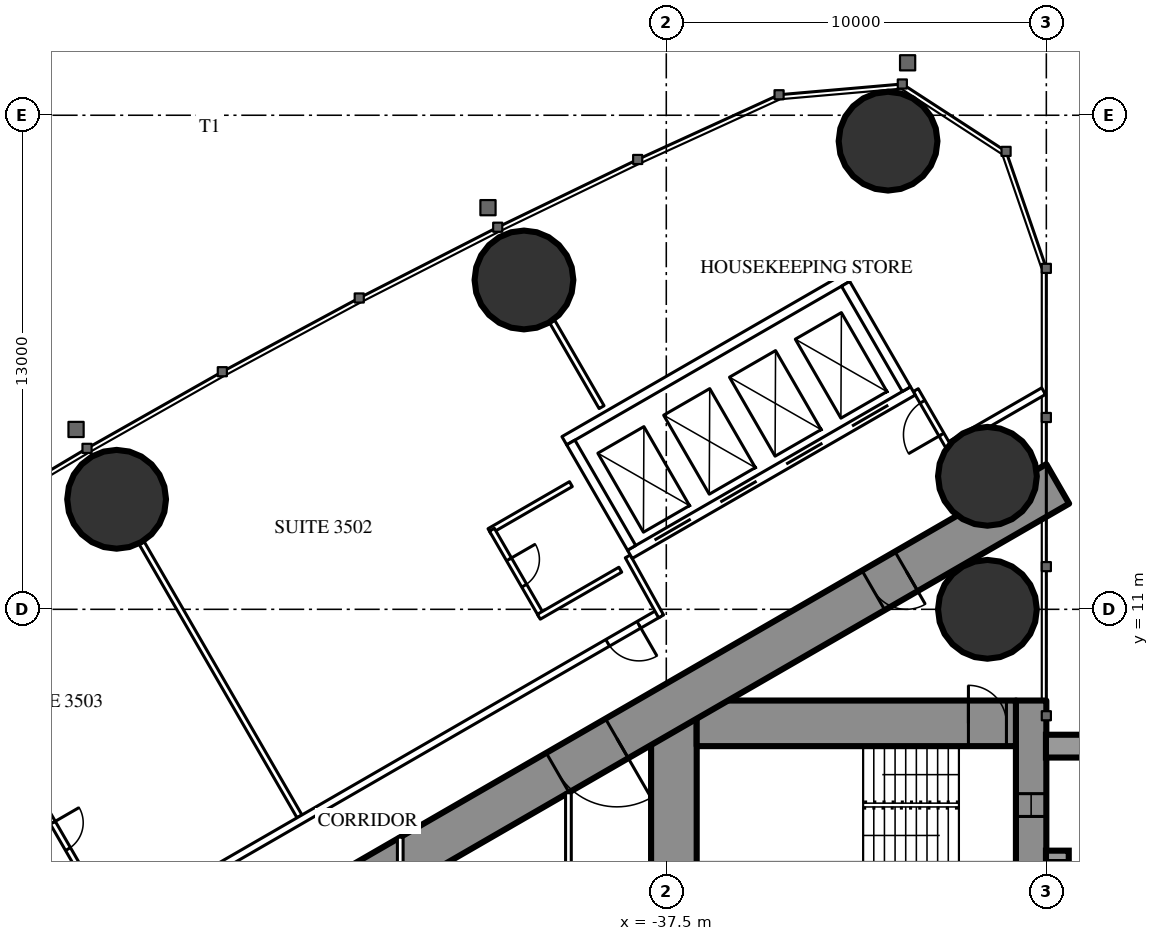
"""IFC4 building model, lengths in metres.
Left out: names, types, materials, properties, quantities, classifications, styles, units other than length and angle.
Written with IfcOpenShell. Run it as: python <this file> out.ifc"""

import sys

from ifc_helpers import new_model, si_unit, direction, frame, frame_2d, origin, origin_2d, place, context, subcontext, project, spatial, rectangle, hollow_circle, extrude, element, fill, save


model = new_model("IFC4")
c1 = context("Model", 3, precision=1e-05, world=origin(), true_north=direction((0.0, 1.0)))
c2 = subcontext(c1, "Body", "Model", "MODEL_VIEW")
j1 = project(units=[si_unit("LENGTHUNIT", "METRE"), si_unit("PLANEANGLEUNIT", "RADIAN")], contexts=[c1])
p1 = place(None, origin())
s1 = spatial("IfcSite", under=j1, at=p1, CompositionType="ELEMENT")
p2 = place(p1, origin())
s2 = spatial("IfcBuilding", under=s1, at=p2, CompositionType="ELEMENT")
p3 = place(p2, frame((0.0, 0.0, 132.6)))
s3 = spatial("IfcBuildingStorey", under=s2, at=p3, CompositionType="ELEMENT", Elevation=132.6)
for number, where, z_axis, x_axis in (
    (1, (-31.665, 23.318, 0.0), (0.0, 0.0, 1.0), (1.0, 0.0, 0.0)),
    (2, (-29.05, 11.0, 0.0), (0.0, 0.0, 1.0), (1.0, 0.0, 0.0)),
    (3, (-29.05, 14.5, 0.0), (0.0, 0.0, 1.0), (1.0, 0.0, 0.0)),
    (4, (-41.245, 19.666, 0.0), (0.0, 0.0, 1.0), (1.0, 0.0, 0.0)),
    (5, (-51.963, 13.895, 0.0), (0.0, 0.0, 1.0), (1.0, 0.0, 0.0)),
):
    element("IfcColumn", number, at=place(p3, frame(where, z_axis=z_axis, x_axis=x_axis)), inside=s3, PredefinedType="COLUMN", context=c2, shape_type="SweptSolid", body=[
        extrude(hollow_circle(Radius=1.3, WallThickness=0.1, at=origin_2d()), origin(), (0.0, 0.0, 1.0), 3.5),
    ])
p4 = place(p3, frame((-27.9, 8.6, 0.0), z_axis=(0.0, 0.0, 1.0), x_axis=(0.0, -1.0, 0.0)))
e6 = element("IfcWall", 6, at=p4, inside=s3, PredefinedType="SHEAR", context=c2, shape_type="SweptSolid", body=[
    extrude(rectangle(XDim=17.2, YDim=0.8, at=frame_2d((8.6, 0.0))), origin(), (0.0, 0.0, 1.0), 3.5),
])
p5 = place(p4, frame((2.45, 0.0, 0.6)))
e7 = element("IfcOpeningElement", 7, at=p5, cuts=e6, PredefinedType="OPENING", context=c2, shape_type="SweptSolid", body=[
    extrude(rectangle(XDim=0.6, YDim=2.1, at=frame_2d((0.3, 1.05))), frame((0.0, 0.41, 0.0), z_axis=(0.0, -1.0, 0.0), x_axis=(1.0, 0.0, 0.0)), (0.0, 0.0, 1.0), 0.82),
])
p6 = place(p4, frame((14.15, 0.0, 0.6)))
e8 = element("IfcOpeningElement", 8, at=p6, cuts=e6, PredefinedType="OPENING", context=c2, shape_type="SweptSolid", body=[
    extrude(rectangle(XDim=0.6, YDim=2.1, at=frame_2d((0.3, 1.05))), frame((0.0, 0.41, 0.0), z_axis=(0.0, -1.0, 0.0), x_axis=(1.0, 0.0, 0.0)), (0.0, 0.0, 1.0), 0.82),
])
p7 = place(p3, frame((-37.3, 8.6, 0.0), z_axis=(0.0, 0.0, 1.0), x_axis=(0.0, -1.0, 0.0)))
e9 = element("IfcWall", 9, at=p7, inside=s3, PredefinedType="SHEAR", context=c2, shape_type="SweptSolid", body=[
    extrude(rectangle(XDim=17.2, YDim=1.2, at=frame_2d((8.6, 0.0))), origin(), (0.0, 0.0, 1.0), 3.5),
])
p8 = place(p7, frame((7.7, 0.0, 0.0)))
e10 = element("IfcOpeningElement", 10, at=p8, cuts=e9, PredefinedType="OPENING", context=c2, shape_type="SweptSolid", body=[
    extrude(rectangle(XDim=1.8, YDim=2.2, at=frame_2d((0.9, 1.1))), frame((0.0, 0.61, 0.0), z_axis=(0.0, -1.0, 0.0), x_axis=(1.0, 0.0, 0.0)), (0.0, 0.0, 1.0), 1.22),
])
p9 = place(p3, frame((-28.3, 8.0, 0.0), z_axis=(0.0, 0.0, 1.0), x_axis=(-1.0, 0.0, 0.0)))
e11 = element("IfcWall", 11, at=p9, inside=s3, PredefinedType="SHEAR", context=c2, shape_type="SweptSolid", body=[
    extrude(rectangle(XDim=8.4, YDim=1.2, at=frame_2d((4.2, 0.0))), origin(), (0.0, 0.0, 1.0), 3.5),
])
p10 = place(p9, frame((0.25, 0.0, 0.0)))
e12 = element("IfcOpeningElement", 12, at=p10, cuts=e11, PredefinedType="OPENING", context=c2, shape_type="SweptSolid", body=[
    extrude(rectangle(XDim=1.0, YDim=2.2, at=frame_2d((0.5, 1.1))), frame((0.0, 0.61, 0.0), z_axis=(0.0, -1.0, 0.0), x_axis=(1.0, 0.0, 0.0)), (0.0, 0.0, 1.0), 1.22),
])
p11 = place(p3, frame((-27.2, 14.3, 0.0), z_axis=(0.0, 0.0, 1.0), x_axis=(-0.866026593062, -0.499997940104, 0.0)))
e13 = element("IfcWall", 13, at=p11, inside=s3, PredefinedType="SHEAR", context=c2, shape_type="SweptSolid", body=[
    extrude(rectangle(XDim=28.946, YDim=1.2, at=frame_2d((14.473, 0.0))), origin(), (0.0, 0.0, 1.0), 3.5),
])
p12 = place(p11, frame((4.6, 0.0, 0.0)))
e14 = element("IfcOpeningElement", 14, at=p12, cuts=e13, PredefinedType="OPENING", context=c2, shape_type="SweptSolid", body=[
    extrude(rectangle(XDim=1.0, YDim=2.2, at=frame_2d((0.5, 1.1))), frame((0.0, 0.61, 0.0), z_axis=(0.0, -1.0, 0.0), x_axis=(1.0, 0.0, 0.0)), (0.0, 0.0, 1.0), 1.22),
])
p13 = place(p11, frame((13.395, 0.0, 0.0)))
e15 = element("IfcOpeningElement", 15, at=p13, cuts=e13, PredefinedType="OPENING", context=c2, shape_type="SweptSolid", body=[
    extrude(rectangle(XDim=1.8, YDim=2.2, at=frame_2d((0.9, 1.1))), frame((0.0, 0.61, 0.0), z_axis=(0.0, -1.0, 0.0), x_axis=(1.0, 0.0, 0.0)), (0.0, 0.0, 1.0), 1.22),
])
p14 = place(p3, frame((-47.151, 5.552, 0.0), z_axis=(0.0, 0.0, 1.0), x_axis=(-0.500003012045, 0.866023664773, 0.0)))
e16 = element("IfcWall", 16, at=p14, inside=s3, PredefinedType="PARTITIONING", context=c2, shape_type="SweptSolid", body=[
    extrude(rectangle(XDim=8.311, YDim=0.15, at=frame_2d((4.156, 0.0))), origin(), (0.0, 0.0, 1.0), 2.2),
])
p15 = place(p3, frame((-39.202, 16.32, 0.0), z_axis=(0.0, 0.0, 1.0), x_axis=(-0.499947391036, 0.866055775454, 0.0)))
e17 = element("IfcWall", 17, at=p15, inside=s3, PredefinedType="PARTITIONING", context=c2, shape_type="SweptSolid", body=[
    extrude(rectangle(XDim=2.599, YDim=0.15, at=frame_2d((1.3, 0.0))), origin(), (0.0, 0.0, 1.0), 3.25),
])
p16 = place(p3, frame((-27.572, 16.741, 0.0), z_axis=(0.0, 0.0, 1.0), x_axis=(-0.866034618596, -0.499984039138, 0.0)))
e18 = element("IfcWall", 18, at=p16, inside=s3, PredefinedType="PARTITIONING", context=c2, shape_type="SweptSolid", body=[
    extrude(rectangle(XDim=2.854, YDim=0.2, at=frame_2d((1.427, 0.0))), origin(), (0.0, 0.0, 1.0), 3.25),
])
p17 = place(p3, frame((-37.7, 10.894, 0.0), z_axis=(0.0, 0.0, 1.0), x_axis=(-0.866027905338, -0.499995667157, 0.0)))
e19 = element("IfcWall", 19, at=p17, inside=s3, PredefinedType="PARTITIONING", context=c2, shape_type="SweptSolid", body=[
    extrude(rectangle(XDim=21.787, YDim=0.2, at=frame_2d((10.894, 0.0))), origin(), (0.0, 0.0, 1.0), 3.25),
])
p18 = place(p17, frame((17.711, 0.0, 0.0)))
e20 = element("IfcOpeningElement", 20, at=p18, cuts=e19, PredefinedType="OPENING", context=c2, shape_type="SweptSolid", body=[
    extrude(rectangle(XDim=0.95, YDim=2.2, at=frame_2d((0.475, 1.1))), frame((0.0, 0.11, 0.0), z_axis=(0.0, -1.0, 0.0), x_axis=(1.0, 0.0, 0.0)), (0.0, 0.0, 1.0), 0.22),
])
p19 = place(p17, frame((19.399, 0.0, 0.0)))
e21 = element("IfcOpeningElement", 21, at=p19, cuts=e19, PredefinedType="OPENING", context=c2, shape_type="SweptSolid", body=[
    extrude(rectangle(XDim=1.8, YDim=2.2, at=frame_2d((0.9, 1.1))), frame((0.0, 0.11, 0.0), z_axis=(0.0, -1.0, 0.0), x_axis=(1.0, 0.0, 0.0)), (0.0, 0.0, 1.0), 0.22),
])
p20 = place(p17, frame((0.6, 0.0, 0.0)))
e22 = element("IfcOpeningElement", 22, at=p20, cuts=e19, PredefinedType="OPENING", context=c2, shape_type="SweptSolid", body=[
    extrude(rectangle(XDim=0.95, YDim=2.2, at=frame_2d((0.475, 1.1))), frame((0.0, 0.11, 0.0), z_axis=(0.0, -1.0, 0.0), x_axis=(1.0, 0.0, 0.0)), (0.0, 0.0, 1.0), 0.22),
])
p21 = place(p3, frame((-38.513, 12.392, 0.0), z_axis=(0.0, 0.0, 1.0), x_axis=(0.485585508183, -0.874189175317, 0.0)))
e23 = element("IfcWall", 23, at=p21, inside=s3, PredefinedType="PARTITIONING", context=c2, shape_type="SweptSolid", body=[
    extrude(rectangle(XDim=1.805, YDim=0.15, at=frame_2d((0.902, 0.0))), origin(), (0.0, 0.0, 1.0), 3.25),
])
p22 = place(p3, frame((-30.033, 15.205, 0.0), z_axis=(0.0, 0.0, 1.0), x_axis=(-0.499980071345, 0.866036909293, 0.0)))
e24 = element("IfcWall", 24, at=p22, inside=s3, PredefinedType="PARTITIONING", context=c2, shape_type="SweptSolid", body=[
    extrude(rectangle(XDim=1.805, YDim=0.15, at=frame_2d((0.902, 0.0))), origin(), (0.0, 0.0, 1.0), 2.2),
])
p23 = place(p22, frame((0.452, 0.0, 0.0)))
e25 = element("IfcOpeningElement", 25, at=p23, cuts=e24, PredefinedType="OPENING", context=c2, shape_type="SweptSolid", body=[
    extrude(rectangle(XDim=1.0, YDim=2.2, at=frame_2d((0.5, 1.1))), frame((0.0, 0.085, 0.0), z_axis=(0.0, -1.0, 0.0), x_axis=(1.0, 0.0, 0.0)), (0.0, 0.0, 1.0), 0.17),
])
p24 = place(p3, frame((-52.792, 3.912, 0.0), z_axis=(0.0, 0.0, 1.0), x_axis=(-0.500006934395, 0.866021400173, 0.0)))
e26 = element("IfcWall", 26, at=p24, inside=s3, PredefinedType="PARTITIONING", context=c2, shape_type="SweptSolid", body=[
    extrude(rectangle(XDim=2.6, YDim=0.15, at=frame_2d((1.3, 0.0))), origin(), (0.0, 0.0, 1.0), 3.25),
])
p25 = place(p24, frame((0.9, 0.0, 0.0)))
e27 = element("IfcOpeningElement", 27, at=p25, cuts=e26, PredefinedType="OPENING", context=c2, shape_type="SweptSolid", body=[
    extrude(rectangle(XDim=0.8, YDim=2.2, at=frame_2d((0.4, 1.1))), frame((0.0, 0.085, 0.0), z_axis=(0.0, -1.0, 0.0), x_axis=(1.0, 0.0, 0.0)), (0.0, 0.0, 1.0), 0.17),
])
p26 = place(p3, frame((-40.01, 14.294, 0.0), z_axis=(0.0, 0.0, 1.0), x_axis=(-0.866031185235, -0.4999899861, 0.0)))
e28 = element("IfcWall", 28, at=p26, inside=s3, PredefinedType="PARTITIONING", context=c2, shape_type="SweptSolid", body=[
    extrude(rectangle(XDim=2.475, YDim=0.15, at=frame_2d((1.238, 0.0))), origin(), (0.0, 0.0, 1.0), 3.25),
])
p27 = place(p3, frame((-40.788, 10.843, 0.0), z_axis=(0.0, 0.0, 1.0), x_axis=(-0.500006934395, 0.866021400173, 0.0)))
e29 = element("IfcWall", 29, at=p27, inside=s3, PredefinedType="PARTITIONING", context=c2, shape_type="SweptSolid", body=[
    extrude(rectangle(XDim=2.6, YDim=0.15, at=frame_2d((1.3, 0.0))), origin(), (0.0, 0.0, 1.0), 3.25),
])
p28 = place(p27, frame((0.9, 0.0, 0.0)))
e30 = element("IfcOpeningElement", 30, at=p28, cuts=e29, PredefinedType="OPENING", context=c2, shape_type="SweptSolid", body=[
    extrude(rectangle(XDim=0.8, YDim=2.2, at=frame_2d((0.4, 1.1))), frame((0.0, 0.085, 0.0), z_axis=(0.0, -1.0, 0.0), x_axis=(1.0, 0.0, 0.0)), (0.0, 0.0, 1.0), 0.17),
])
p29 = place(p3, frame((-38.71, 12.042, 0.0), z_axis=(0.0, 0.0, 1.0), x_axis=(-0.86604923931, -0.499958713387, 0.0)))
e31 = element("IfcWall", 31, at=p29, inside=s3, PredefinedType="PARTITIONING", context=c2, shape_type="SweptSolid", body=[
    extrude(rectangle(XDim=2.475, YDim=0.15, at=frame_2d((1.237, 0.0))), origin(), (0.0, 0.0, 1.0), 3.25),
])
p30 = place(p3, frame((-40.075, 6.174, 0.0), z_axis=(0.0, 0.0, 1.0), x_axis=(0.0, -1.0, 0.0)))
e32 = element("IfcWall", 32, at=p30, inside=s3, PredefinedType="PARTITIONING", context=c2, shape_type="SweptSolid", body=[
    extrude(rectangle(XDim=7.374, YDim=0.15, at=frame_2d((3.687, 0.0))), origin(), (0.0, 0.0, 1.0), 3.25),
])
p31 = place(p30, frame((2.787, 0.0, 0.0)))
e33 = element("IfcOpeningElement", 33, at=p31, cuts=e32, PredefinedType="OPENING", context=c2, shape_type="SweptSolid", body=[
    extrude(rectangle(XDim=1.8, YDim=2.2, at=frame_2d((0.9, 1.1))), frame((0.0, 0.085, 0.0), z_axis=(0.0, -1.0, 0.0), x_axis=(1.0, 0.0, 0.0)), (0.0, 0.0, 1.0), 0.17),
])
p32 = place(p3, frame((-44.5, 5.005, 0.0), z_axis=(0.0, 0.0, 1.0), x_axis=(0.0, -1.0, 0.0)))
e34 = element("IfcWall", 34, at=p32, inside=s3, PredefinedType="PARTITIONING", context=c2, shape_type="SweptSolid", body=[
    extrude(rectangle(XDim=10.009, YDim=0.15, at=frame_2d((5.005, 0.0))), origin(), (0.0, 0.0, 1.0), 2.45),
])
p33 = place(p32, frame((4.505, 0.0, 0.0)))
e35 = element("IfcOpeningElement", 35, at=p33, cuts=e34, PredefinedType="OPENING", context=c2, shape_type="SweptSolid", body=[
    extrude(rectangle(XDim=1.0, YDim=2.2, at=frame_2d((0.5, 1.1))), frame((0.0, 0.085, 0.0), z_axis=(0.0, -1.0, 0.0), x_axis=(1.0, 0.0, 0.0)), (0.0, 0.0, 1.0), 0.17),
])
p34 = place(p3, frame((-31.01, 16.747, 0.0), z_axis=(0.0, 0.0, 1.0), x_axis=(-0.866028165386, -0.499995216735, 0.0)))
e36 = element("IfcWall", 36, at=p34, inside=s3, PredefinedType="PARTITIONING", context=c2, shape_type="SweptSolid", body=[
    extrude(rectangle(XDim=8.6, YDim=0.25, at=frame_2d((4.3, 0.0))), origin(), (0.0, 0.0, 1.0), 3.25),
])
p35 = place(p34, frame((0.75, 0.0, 0.0)))
e37 = element("IfcOpeningElement", 37, at=p35, cuts=e36, PredefinedType="OPENING", context=c2, shape_type="SweptSolid", body=[
    extrude(rectangle(XDim=1.1, YDim=2.2, at=frame_2d((0.55, 1.1))), frame((0.0, 0.135, 0.0), z_axis=(0.0, -1.0, 0.0), x_axis=(1.0, 0.0, 0.0)), (0.0, 0.0, 1.0), 0.27),
])
p36 = place(p34, frame((2.75, 0.0, 0.0)))
e38 = element("IfcOpeningElement", 38, at=p36, cuts=e36, PredefinedType="OPENING", context=c2, shape_type="SweptSolid", body=[
    extrude(rectangle(XDim=1.1, YDim=2.2, at=frame_2d((0.55, 1.1))), frame((0.0, 0.135, 0.0), z_axis=(0.0, -1.0, 0.0), x_axis=(1.0, 0.0, 0.0)), (0.0, 0.0, 1.0), 0.27),
])
p37 = place(p34, frame((4.75, 0.0, 0.0)))
e39 = element("IfcOpeningElement", 39, at=p37, cuts=e36, PredefinedType="OPENING", context=c2, shape_type="SweptSolid", body=[
    extrude(rectangle(XDim=1.1, YDim=2.2, at=frame_2d((0.55, 1.1))), frame((0.0, 0.135, 0.0), z_axis=(0.0, -1.0, 0.0), x_axis=(1.0, 0.0, 0.0)), (0.0, 0.0, 1.0), 0.27),
])
p38 = place(p34, frame((6.75, 0.0, 0.0)))
e40 = element("IfcOpeningElement", 40, at=p38, cuts=e36, PredefinedType="OPENING", context=c2, shape_type="SweptSolid", body=[
    extrude(rectangle(XDim=1.1, YDim=2.2, at=frame_2d((0.55, 1.1))), frame((0.0, 0.135, 0.0), z_axis=(0.0, -1.0, 0.0), x_axis=(1.0, 0.0, 0.0)), (0.0, 0.0, 1.0), 0.27),
])
p39 = place(p3, frame((-32.736, 19.736, 0.0), z_axis=(0.0, 0.0, 1.0), x_axis=(-0.866028165386, -0.499995216735, 0.0)))
e41 = element("IfcWall", 41, at=p39, inside=s3, PredefinedType="PARTITIONING", context=c2, shape_type="SweptSolid", body=[
    extrude(rectangle(XDim=8.6, YDim=0.25, at=frame_2d((4.3, 0.0))), origin(), (0.0, 0.0, 1.0), 3.25),
])
p40 = place(p3, frame((-31.181, 16.793, 0.0), z_axis=(0.0, 0.0, 1.0), x_axis=(-0.499929347863, 0.866066190972, 0.0)))
e42 = element("IfcWall", 42, at=p40, inside=s3, PredefinedType="PARTITIONING", context=c2, shape_type="SweptSolid", body=[
    extrude(rectangle(XDim=3.201, YDim=0.25, at=frame_2d((1.6, 0.0))), origin(), (0.0, 0.0, 1.0), 3.25),
])
p41 = place(p3, frame((-38.413, 12.618, 0.0), z_axis=(0.0, 0.0, 1.0), x_axis=(-0.499872130319, 0.866099216793, 0.0)))
e43 = element("IfcWall", 43, at=p41, inside=s3, PredefinedType="PARTITIONING", context=c2, shape_type="SweptSolid", body=[
    extrude(rectangle(XDim=3.2, YDim=0.25, at=frame_2d((1.6, 0.0))), origin(), (0.0, 0.0, 1.0), 3.25),
])
p42 = place(p25, origin())
e44 = element("IfcDoor", 44, at=p42, inside=s3, OperationType="SINGLE_SWING_RIGHT", PredefinedType="DOOR", context=c2, shape_type="SweptSolid", body=[
    extrude(rectangle(XDim=0.8, YDim=2.2, at=frame_2d((0.4, 1.1))), frame((0.0, 0.025, 0.0), z_axis=(0.0, -1.0, 0.0), x_axis=(1.0, 0.0, 0.0)), (0.0, 0.0, 1.0), 0.05),
])
fill(e27, e44)
p43 = place(p28, origin())
e45 = element("IfcDoor", 45, at=p43, inside=s3, OperationType="SINGLE_SWING_RIGHT", PredefinedType="DOOR", context=c2, shape_type="SweptSolid", body=[
    extrude(rectangle(XDim=0.8, YDim=2.2, at=frame_2d((0.4, 1.1))), frame((0.0, 0.025, 0.0), z_axis=(0.0, -1.0, 0.0), x_axis=(1.0, 0.0, 0.0)), (0.0, 0.0, 1.0), 0.05),
])
fill(e30, e45)
p44 = place(p20, origin())
e46 = element("IfcDoor", 46, at=p44, inside=s3, OperationType="SINGLE_SWING_LEFT", PredefinedType="DOOR", context=c2, shape_type="SweptSolid", body=[
    extrude(rectangle(XDim=0.95, YDim=2.2, at=frame_2d((0.475, 1.1))), frame((0.0, 0.025, 0.0), z_axis=(0.0, -1.0, 0.0), x_axis=(1.0, 0.0, 0.0)), (0.0, 0.0, 1.0), 0.05),
])
fill(e22, e46)
p45 = place(p23, origin())
e47 = element("IfcDoor", 47, at=p45, inside=s3, OperationType="SINGLE_SWING_LEFT", PredefinedType="DOOR", context=c2, shape_type="SweptSolid", body=[
    extrude(rectangle(XDim=1.0, YDim=2.2, at=frame_2d((0.5, 1.1))), frame((0.0, 0.025, 0.0), z_axis=(0.0, -1.0, 0.0), x_axis=(1.0, 0.0, 0.0)), (0.0, 0.0, 1.0), 0.05),
])
fill(e25, e47)
p46 = place(p12, origin())
e48 = element("IfcDoor", 48, at=p46, inside=s3, OperationType="SINGLE_SWING_LEFT", PredefinedType="DOOR", context=c2, shape_type="SweptSolid", body=[
    extrude(rectangle(XDim=1.0, YDim=2.2, at=frame_2d((0.5, 1.1))), frame((0.0, 0.025, 0.0), z_axis=(0.0, -1.0, 0.0), x_axis=(1.0, 0.0, 0.0)), (0.0, 0.0, 1.0), 0.05),
])
fill(e14, e48)
p47 = place(p13, origin())
e49 = element("IfcDoor", 49, at=p47, inside=s3, OperationType="DOUBLE_DOOR_SINGLE_SWING", PredefinedType="DOOR", context=c2, shape_type="SweptSolid", body=[
    extrude(rectangle(XDim=1.8, YDim=2.2, at=frame_2d((0.9, 1.1))), frame((0.0, 0.025, 0.0), z_axis=(0.0, -1.0, 0.0), x_axis=(1.0, 0.0, 0.0)), (0.0, 0.0, 1.0), 0.05),
])
fill(e15, e49)
p48 = place(p10, origin())
e50 = element("IfcDoor", 50, at=p48, inside=s3, OperationType="SINGLE_SWING_RIGHT", PredefinedType="DOOR", context=c2, shape_type="SweptSolid", body=[
    extrude(rectangle(XDim=1.0, YDim=2.2, at=frame_2d((0.5, 1.1))), frame((0.0, 0.025, 0.0), z_axis=(0.0, -1.0, 0.0), x_axis=(1.0, 0.0, 0.0)), (0.0, 0.0, 1.0), 0.05),
])
fill(e12, e50)
p49 = place(p35, origin())
e51 = element("IfcDoor", 51, at=p49, inside=s3, OperationType="DOUBLE_DOOR_SLIDING", PredefinedType="USERDEFINED", context=c2, shape_type="SweptSolid", body=[
    extrude(rectangle(XDim=1.1, YDim=2.2, at=frame_2d((0.55, 1.1))), frame((0.0, 0.025, 0.0), z_axis=(0.0, -1.0, 0.0), x_axis=(1.0, 0.0, 0.0)), (0.0, 0.0, 1.0), 0.05),
])
fill(e37, e51)
p50 = place(p36, origin())
e52 = element("IfcDoor", 52, at=p50, inside=s3, OperationType="DOUBLE_DOOR_SLIDING", PredefinedType="USERDEFINED", context=c2, shape_type="SweptSolid", body=[
    extrude(rectangle(XDim=1.1, YDim=2.2, at=frame_2d((0.55, 1.1))), frame((0.0, 0.025, 0.0), z_axis=(0.0, -1.0, 0.0), x_axis=(1.0, 0.0, 0.0)), (0.0, 0.0, 1.0), 0.05),
])
fill(e38, e52)
p51 = place(p37, origin())
e53 = element("IfcDoor", 53, at=p51, inside=s3, OperationType="DOUBLE_DOOR_SLIDING", PredefinedType="USERDEFINED", context=c2, shape_type="SweptSolid", body=[
    extrude(rectangle(XDim=1.1, YDim=2.2, at=frame_2d((0.55, 1.1))), frame((0.0, 0.025, 0.0), z_axis=(0.0, -1.0, 0.0), x_axis=(1.0, 0.0, 0.0)), (0.0, 0.0, 1.0), 0.05),
])
fill(e39, e53)
p52 = place(p38, origin())
e54 = element("IfcDoor", 54, at=p52, inside=s3, OperationType="DOUBLE_DOOR_SLIDING", PredefinedType="USERDEFINED", context=c2, shape_type="SweptSolid", body=[
    extrude(rectangle(XDim=1.1, YDim=2.2, at=frame_2d((0.55, 1.1))), frame((0.0, 0.025, 0.0), z_axis=(0.0, -1.0, 0.0), x_axis=(1.0, 0.0, 0.0)), (0.0, 0.0, 1.0), 0.05),
])
fill(e40, e54)
p53 = place(p5, origin())
e55 = element("IfcWindow", 55, at=p53, inside=s3, PartitioningType="SINGLE_PANEL", PredefinedType="WINDOW", context=c2, shape_type="SweptSolid", body=[
    extrude(rectangle(XDim=0.6, YDim=2.1, at=frame_2d((0.3, 1.05))), frame((0.0, 0.03, 0.0), z_axis=(0.0, -1.0, 0.0), x_axis=(1.0, 0.0, 0.0)), (0.0, 0.0, 1.0), 0.06),
])
fill(e7, e55)
save(model, sys.argv[1])
